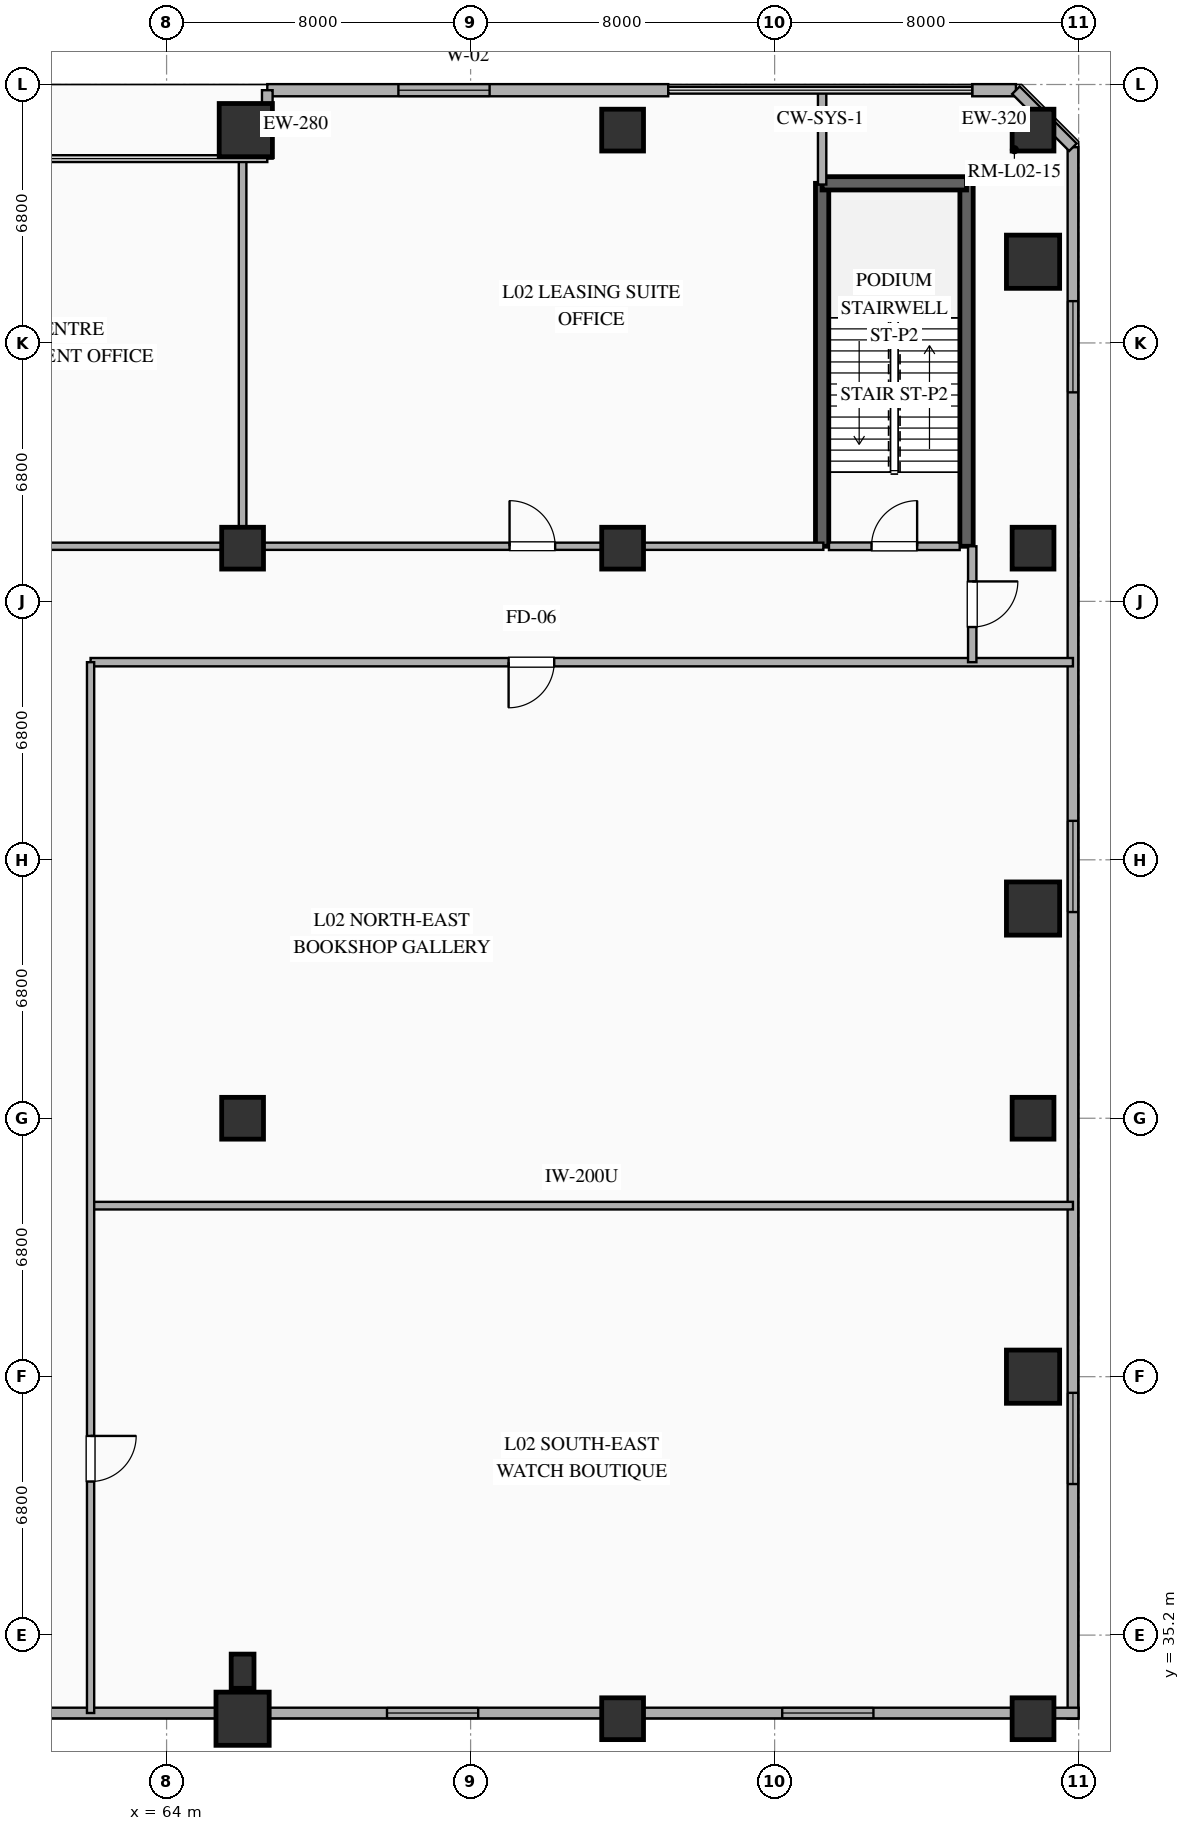
"""IFC4 building model, lengths in metres.
Left out: names, types, materials, properties, quantities, classifications, styles, units other than length and angle.
Written with IfcOpenShell. Run it as: python <this file> out.ifc"""

import sys

from ifc_helpers import new_model, si_unit, direction, frame, frame_2d, origin, origin_2d, place, context, subcontext, project, spatial, rectangle, extrude, element, fill, save


model = new_model("IFC4")
c1 = context("Model", 3, precision=1e-05, world=origin(), true_north=direction((0.0, 1.0)))
c2 = subcontext(c1, "Body", "Model", "MODEL_VIEW")
j1 = project(units=[si_unit("LENGTHUNIT", "METRE"), si_unit("PLANEANGLEUNIT", "RADIAN")], contexts=[c1])
p1 = place(None, origin())
s1 = spatial("IfcSite", under=j1, at=p1, CompositionType="ELEMENT")
p2 = place(p1, origin())
s2 = spatial("IfcBuilding", under=s1, at=p2, CompositionType="ELEMENT")
p3 = place(p2, frame((0.0, 0.0, 11.4)))
s3 = spatial("IfcBuildingStorey", under=s2, at=p3, CompositionType="ELEMENT", Elevation=11.4)
for number, where, z_axis, x_axis in (
    (1, (66.0, 63.8, 0.0), (0.0, 0.0, 1.0), (1.0, 0.0, 0.0)),
    (2, (76.0, 74.8, 0.0), (0.0, 0.0, 1.0), (1.0, 0.0, 0.0)),
    (3, (76.0, 63.8, 0.0), (0.0, 0.0, 1.0), (1.0, 0.0, 0.0)),
    (4, (86.8, 74.8, 0.0), (0.0, 0.0, 1.0), (1.0, 0.0, 0.0)),
    (5, (86.8, 63.8, 0.0), (0.0, 0.0, 1.0), (1.0, 0.0, 0.0)),
    (6, (86.8, 33.0, 0.0), (0.0, 0.0, 1.0), (1.0, 0.0, 0.0)),
    (7, (86.8, 48.8, 0.0), (0.0, 0.0, 1.0), (1.0, 0.0, 0.0)),
):
    element("IfcColumn", number, at=place(p3, frame(where, z_axis=z_axis, x_axis=x_axis)), inside=s3, PredefinedType="COLUMN", context=c2, shape_type="SweptSolid", body=[
        extrude(rectangle(XDim=1.1, YDim=1.1, at=origin_2d()), origin(), (0.0, 0.0, 1.0), 5.1),
    ])
p4 = place(p3, frame((66.0, 33.0, 0.0), z_axis=(0.0, 0.0, 1.0), x_axis=(1.0, 0.0, 0.0)))
e8 = element("IfcColumn", 8, at=p4, inside=s3, PredefinedType="COLUMN", context=c2, shape_type="SweptSolid", body=[
    extrude(rectangle(XDim=1.4, YDim=1.4, at=origin_2d()), origin(), (0.0, 0.0, 1.0), 5.1),
])
for number, where, z_axis, x_axis in (
    (9, (76.0, 33.0, 0.0), (0.0, 0.0, 1.0), (1.0, 0.0, 0.0)),
    (10, (66.0, 48.8, 0.0), (0.0, 0.0, 1.0), (1.0, 0.0, 0.0)),
):
    element("IfcColumn", number, at=place(p3, frame(where, z_axis=z_axis, x_axis=x_axis)), inside=s3, PredefinedType="COLUMN", context=c2, shape_type="SweptSolid", body=[
        extrude(rectangle(XDim=1.1, YDim=1.1, at=origin_2d()), origin(), (0.0, 0.0, 1.0), 5.1),
    ])
for number, where, z_axis, x_axis in (
    (11, (86.8, 42.0, 0.0), (0.0, 0.0, 1.0), (1.0, 0.0, 0.0)),
    (12, (86.8, 54.318, 0.0), (0.0, 0.0, 1.0), (1.0, 0.0, 0.0)),
    (13, (86.8, 71.337, 0.0), (0.0, 0.0, 1.0), (1.0, 0.0, 0.0)),
    (14, (66.084, 74.8, 0.0), (0.0, 0.0, 1.0), (1.0, 0.0, 0.0)),
):
    element("IfcColumn", number, at=place(p3, frame(where, z_axis=z_axis, x_axis=x_axis)), inside=s3, PredefinedType="COLUMN", context=c2, shape_type="SweptSolid", body=[
        extrude(rectangle(XDim=1.4, YDim=1.4, at=origin_2d()), origin(), (0.0, 0.0, 1.0), 5.1),
    ])
for number, where, z_axis, x_axis in (
    (15, (81.25, 63.85, 0.0), (0.0, 0.0, 1.0), (0.0, 1.0, 0.0)),
    (16, (85.05, 63.85, 0.0), (0.0, 0.0, 1.0), (0.0, 1.0, 0.0)),
):
    element("IfcWall", number, at=place(p3, frame(where, z_axis=z_axis, x_axis=x_axis)), inside=s3, PredefinedType="SHEAR", context=c2, shape_type="SweptSolid", body=[
        extrude(rectangle(XDim=9.55, YDim=0.35, at=frame_2d((4.775, 0.0))), origin(), (0.0, 0.0, 1.0), 5.1),
    ])
p5 = place(p3, frame((81.25, 73.4, 0.0), z_axis=(0.0, 0.0, 1.0), x_axis=(1.0, 0.0, 0.0)))
e17 = element("IfcWall", 17, at=p5, inside=s3, PredefinedType="SHEAR", context=c2, shape_type="SweptSolid", body=[
    extrude(rectangle(XDim=3.8, YDim=0.35, at=frame_2d((1.9, 0.0))), origin(), (0.0, 0.0, 1.0), 5.1),
])
p6 = place(p3, frame((66.0, 34.25, 0.0), z_axis=(0.0, 0.0, 1.0), x_axis=(1.0, 0.0, 0.0)))
e18 = element("IfcColumn", 18, at=p6, inside=s3, PredefinedType="PILASTER", context=c2, shape_type="SweptSolid", body=[
    extrude(rectangle(XDim=0.6, YDim=0.9, at=origin_2d()), origin(), (0.0, 0.0, 1.0), 5.1),
])
p7 = place(p3, frame((86.35, 75.85, 0.0), z_axis=(0.0, 0.0, 1.0), x_axis=(-1.0, 0.0, 0.0)))
e19 = element("IfcWall", 19, at=p7, inside=s3, PredefinedType="SOLIDWALL", context=c2, shape_type="SweptSolid", body=[
    extrude(rectangle(XDim=1.15, YDim=0.32, at=frame_2d((0.575, 0.0))), origin(), (0.0, 0.0, 1.0), 5.1),
])
p8 = place(p3, frame((66.65, 75.85, 0.0), z_axis=(0.0, 0.0, 1.0), x_axis=(1.0, 0.0, 0.0)))
e20 = element("IfcWall", 20, at=p8, inside=s3, PredefinedType="SOLIDWALL", context=c2, shape_type="SweptSolid", body=[
    extrude(rectangle(XDim=10.55, YDim=0.32, at=frame_2d((5.275, 0.0))), origin(), (0.0, 0.0, 1.0), 5.1),
])
p9 = place(p8, frame((3.45, 0.0, 0.9)))
e21 = element("IfcOpeningElement", 21, at=p9, cuts=e20, PredefinedType="OPENING", context=c2, shape_type="SweptSolid", body=[
    extrude(rectangle(XDim=2.4, YDim=2.6, at=frame_2d((1.2, 1.3))), frame((0.0, 0.17, 0.0), z_axis=(0.0, -1.0, 0.0), x_axis=(1.0, 0.0, 0.0)), (0.0, 0.0, 1.0), 0.34),
])
p10 = place(p3, frame((66.65, 75.85, 0.0), z_axis=(0.0, 0.0, 1.0), x_axis=(0.0, -1.0, 0.0)))
e22 = element("IfcWall", 22, at=p10, inside=s3, PredefinedType="SOLIDWALL", context=c2, shape_type="SweptSolid", body=[
    extrude(rectangle(XDim=1.8, YDim=0.28, at=frame_2d((0.9, 0.0))), origin(), (0.0, 0.0, 1.0), 5.1),
])
p11 = place(p3, frame((87.85, 74.35, 0.0), z_axis=(0.0, 0.0, 1.0), x_axis=(0.0, -1.0, 0.0)))
e23 = element("IfcWall", 23, at=p11, inside=s3, PredefinedType="SOLIDWALL", context=c2, shape_type="SweptSolid", body=[
    extrude(rectangle(XDim=41.35, YDim=0.28, at=frame_2d((20.675, 0.0))), origin(), (0.0, 0.0, 1.0), 5.1),
])
p12 = place(p11, frame((4.05, 0.0, 0.9)))
e24 = element("IfcOpeningElement", 24, at=p12, cuts=e23, PredefinedType="OPENING", context=c2, shape_type="SweptSolid", body=[
    extrude(rectangle(XDim=2.4, YDim=2.6, at=frame_2d((1.2, 1.3))), frame((0.0, 0.15, 0.0), z_axis=(0.0, -1.0, 0.0), x_axis=(1.0, 0.0, 0.0)), (0.0, 0.0, 1.0), 0.3),
])
p13 = place(p11, frame((17.725, 0.0, 0.9)))
e25 = element("IfcOpeningElement", 25, at=p13, cuts=e23, PredefinedType="OPENING", context=c2, shape_type="SweptSolid", body=[
    extrude(rectangle(XDim=2.4, YDim=2.6, at=frame_2d((1.2, 1.3))), frame((0.0, 0.15, 0.0), z_axis=(0.0, -1.0, 0.0), x_axis=(1.0, 0.0, 0.0)), (0.0, 0.0, 1.0), 0.3),
])
p14 = place(p11, frame((32.775, 0.0, 0.9)))
e26 = element("IfcOpeningElement", 26, at=p14, cuts=e23, PredefinedType="OPENING", context=c2, shape_type="SweptSolid", body=[
    extrude(rectangle(XDim=2.4, YDim=2.6, at=frame_2d((1.2, 1.3))), frame((0.0, 0.15, 0.0), z_axis=(0.0, -1.0, 0.0), x_axis=(1.0, 0.0, 0.0)), (0.0, 0.0, 1.0), 0.3),
])
p15 = place(p3, frame((88.0, 33.15, 0.0), z_axis=(0.0, 0.0, 1.0), x_axis=(-1.0, 0.0, 0.0)))
e27 = element("IfcWall", 27, at=p15, inside=s3, PredefinedType="SOLIDWALL", context=c2, shape_type="SweptSolid", body=[
    extrude(rectangle(XDim=80.0, YDim=0.28, at=frame_2d((40.0, 0.0))), origin(), (0.0, 0.0, 1.0), 4.35),
])
p16 = place(p15, frame((5.4, 0.0, 0.9)))
e28 = element("IfcOpeningElement", 28, at=p16, cuts=e27, PredefinedType="OPENING", context=c2, shape_type="SweptSolid", body=[
    extrude(rectangle(XDim=2.4, YDim=2.6, at=frame_2d((1.2, 1.3))), frame((0.0, 0.15, 0.0), z_axis=(0.0, -1.0, 0.0), x_axis=(1.0, 0.0, 0.0)), (0.0, 0.0, 1.0), 0.3),
])
p17 = place(p15, frame((15.8, 0.0, 0.9)))
e29 = element("IfcOpeningElement", 29, at=p17, cuts=e27, PredefinedType="OPENING", context=c2, shape_type="SweptSolid", body=[
    extrude(rectangle(XDim=2.4, YDim=2.6, at=frame_2d((1.2, 1.3))), frame((0.0, 0.15, 0.0), z_axis=(0.0, -1.0, 0.0), x_axis=(1.0, 0.0, 0.0)), (0.0, 0.0, 1.0), 0.3),
])
p18 = place(p15, frame((38.8, 0.0, 0.9)))
e30 = element("IfcOpeningElement", 30, at=p18, cuts=e27, PredefinedType="OPENING", context=c2, shape_type="SweptSolid", body=[
    extrude(rectangle(XDim=2.4, YDim=2.6, at=frame_2d((1.2, 1.3))), frame((0.0, 0.15, 0.0), z_axis=(0.0, -1.0, 0.0), x_axis=(1.0, 0.0, 0.0)), (0.0, 0.0, 1.0), 0.3),
])
p19 = place(p15, frame((61.8, 0.0, 0.9)))
e31 = element("IfcOpeningElement", 31, at=p19, cuts=e27, PredefinedType="OPENING", context=c2, shape_type="SweptSolid", body=[
    extrude(rectangle(XDim=2.4, YDim=2.6, at=frame_2d((1.2, 1.3))), frame((0.0, 0.15, 0.0), z_axis=(0.0, -1.0, 0.0), x_axis=(1.0, 0.0, 0.0)), (0.0, 0.0, 1.0), 0.3),
])
p20 = place(p15, frame((72.2, 0.0, 0.9)))
e32 = element("IfcOpeningElement", 32, at=p20, cuts=e27, PredefinedType="OPENING", context=c2, shape_type="SweptSolid", body=[
    extrude(rectangle(XDim=2.4, YDim=2.6, at=frame_2d((1.2, 1.3))), frame((0.0, 0.15, 0.0), z_axis=(0.0, -1.0, 0.0), x_axis=(1.0, 0.0, 0.0)), (0.0, 0.0, 1.0), 0.3),
])
p21 = place(p3, frame((87.85, 74.35, 0.0), z_axis=(0.0, 0.0, 1.0), x_axis=(-0.707106781187, 0.707106781187, 0.0)))
e33 = element("IfcWall", 33, at=p21, inside=s3, PredefinedType="SOLIDWALL", context=c2, shape_type="SweptSolid", body=[
    extrude(rectangle(XDim=2.121, YDim=0.28, at=frame_2d((1.061, 0.0))), origin(), (0.0, 0.0, 1.0), 5.1),
])
p22 = place(p3, frame((81.43, 63.85, 0.0), z_axis=(0.0, 0.0, 1.0), x_axis=(1.0, 0.0, 0.0)))
e34 = element("IfcWall", 34, at=p22, inside=s3, PredefinedType="SOLIDWALL", context=c2, shape_type="SweptSolid", body=[
    extrude(rectangle(XDim=3.44, YDim=0.2, at=frame_2d((1.72, 0.0))), origin(), (0.0, 0.0, 1.0), 4.3),
])
p23 = place(p22, frame((1.12, 0.0, 0.0)))
e35 = element("IfcOpeningElement", 35, at=p23, cuts=e34, PredefinedType="OPENING", context=c2, shape_type="SweptSolid", body=[
    extrude(rectangle(XDim=1.2, YDim=2.15, at=frame_2d((0.6, 1.075))), frame((0.0, 0.11, 0.0), z_axis=(0.0, -1.0, 0.0), x_axis=(1.0, 0.0, 0.0)), (0.0, 0.0, 1.0), 0.22),
])
p24 = place(p3, frame((62.0, 46.5, 0.0), z_axis=(0.0, 0.0, 1.0), x_axis=(1.0, 0.0, 0.0)))
e36 = element("IfcWall", 36, at=p24, inside=s3, PredefinedType="PARTITIONING", context=c2, shape_type="SweptSolid", body=[
    extrude(rectangle(XDim=25.85, YDim=0.2, at=frame_2d((12.925, 0.0))), origin(), (0.0, 0.0, 1.0), 4.3),
])
p25 = place(p3, frame((87.85, 60.8, 0.0), z_axis=(0.0, 0.0, 1.0), x_axis=(-1.0, 0.0, 0.0)))
e37 = element("IfcWall", 37, at=p25, inside=s3, PredefinedType="SOLIDWALL", context=c2, shape_type="SweptSolid", body=[
    extrude(rectangle(XDim=25.85, YDim=0.22, at=frame_2d((12.925, 0.0))), origin(), (0.0, 0.0, 1.0), 4.3),
])
p26 = place(p25, frame((13.65, 0.0, 0.0)))
e38 = element("IfcOpeningElement", 38, at=p26, cuts=e37, PredefinedType="OPENING", context=c2, shape_type="SweptSolid", body=[
    extrude(rectangle(XDim=1.2, YDim=2.25, at=frame_2d((0.6, 1.125))), frame((0.0, 0.12, 0.0), z_axis=(0.0, -1.0, 0.0), x_axis=(1.0, 0.0, 0.0)), (0.0, 0.0, 1.0), 0.24),
])
p27 = place(p3, frame((40.768, 63.85, 0.0), z_axis=(0.0, 0.0, 1.0), x_axis=(1.0, 0.0, 0.0)))
e39 = element("IfcWall", 39, at=p27, inside=s3, PredefinedType="PARTITIONING", context=c2, shape_type="SweptSolid", body=[
    extrude(rectangle(XDim=40.514, YDim=0.19, at=frame_2d((20.257, 0.0))), origin(), (0.0, 0.0, 1.0), 4.3),
])
p28 = place(p27, frame((32.257, 0.0, 0.0)))
e40 = element("IfcOpeningElement", 40, at=p28, cuts=e39, PredefinedType="OPENING", context=c2, shape_type="SweptSolid", body=[
    extrude(rectangle(XDim=1.2, YDim=2.25, at=frame_2d((0.6, 1.125))), frame((0.0, 0.105, 0.0), z_axis=(0.0, -1.0, 0.0), x_axis=(1.0, 0.0, 0.0)), (0.0, 0.0, 1.0), 0.21),
])
p29 = place(p27, frame((17.632, 0.0, 0.0)))
e41 = element("IfcOpeningElement", 41, at=p29, cuts=e39, PredefinedType="OPENING", context=c2, shape_type="SweptSolid", body=[
    extrude(rectangle(XDim=1.2, YDim=2.25, at=frame_2d((0.6, 1.125))), frame((0.0, 0.105, 0.0), z_axis=(0.0, -1.0, 0.0), x_axis=(1.0, 0.0, 0.0)), (0.0, 0.0, 1.0), 0.21),
])
p30 = place(p27, frame((8.232, 0.0, 0.0)))
e42 = element("IfcOpeningElement", 42, at=p30, cuts=e39, PredefinedType="OPENING", context=c2, shape_type="SweptSolid", body=[
    extrude(rectangle(XDim=1.2, YDim=2.25, at=frame_2d((0.6, 1.125))), frame((0.0, 0.105, 0.0), z_axis=(0.0, -1.0, 0.0), x_axis=(1.0, 0.0, 0.0)), (0.0, 0.0, 1.0), 0.21),
])
p31 = place(p27, frame((3.982, 0.0, 0.0)))
e43 = element("IfcOpeningElement", 43, at=p31, cuts=e39, PredefinedType="OPENING", context=c2, shape_type="SweptSolid", body=[
    extrude(rectangle(XDim=0.9, YDim=2.1, at=frame_2d((0.45, 1.05))), frame((0.0, 0.105, 0.0), z_axis=(0.0, -1.0, 0.0), x_axis=(1.0, 0.0, 0.0)), (0.0, 0.0, 1.0), 0.21),
])
p32 = place(p3, frame((62.0, 60.8, 0.0), z_axis=(0.0, 0.0, 1.0), x_axis=(0.0, -1.0, 0.0)))
e44 = element("IfcWall", 44, at=p32, inside=s3, PredefinedType="PARTITIONING", context=c2, shape_type="SweptSolid", body=[
    extrude(rectangle(XDim=27.65, YDim=0.19, at=frame_2d((13.825, 0.0))), origin(), (0.0, 0.0, 1.0), 4.3),
])
p33 = place(p32, frame((20.359, 0.0, 0.0)))
e45 = element("IfcOpeningElement", 45, at=p33, cuts=e44, PredefinedType="OPENING", context=c2, shape_type="SweptSolid", body=[
    extrude(rectangle(XDim=1.2, YDim=2.25, at=frame_2d((0.6, 1.125))), frame((0.0, 0.105, 0.0), z_axis=(0.0, -1.0, 0.0), x_axis=(1.0, 0.0, 0.0)), (0.0, 0.0, 1.0), 0.21),
])
p34 = place(p3, frame((66.0, 74.05, 0.0), z_axis=(0.0, 0.0, 1.0), x_axis=(0.0, -1.0, 0.0)))
e46 = element("IfcWall", 46, at=p34, inside=s3, PredefinedType="PARTITIONING", context=c2, shape_type="SweptSolid", body=[
    extrude(rectangle(XDim=10.2, YDim=0.2, at=frame_2d((5.1, 0.0))), origin(), (0.0, 0.0, 1.0), 4.3),
])
p35 = place(p3, frame((85.2, 63.85, 0.0), z_axis=(0.0, 0.0, 1.0), x_axis=(0.0, -1.0, 0.0)))
e47 = element("IfcWall", 47, at=p35, inside=s3, PredefinedType="SOLIDWALL", context=c2, shape_type="SweptSolid", body=[
    extrude(rectangle(XDim=3.05, YDim=0.22, at=frame_2d((1.525, 0.0))), origin(), (0.0, 0.0, 1.0), 4.3),
])
p36 = place(p35, frame((0.925, 0.0, 0.0)))
e48 = element("IfcOpeningElement", 48, at=p36, cuts=e47, PredefinedType="OPENING", context=c2, shape_type="SweptSolid", body=[
    extrude(rectangle(XDim=1.2, YDim=2.25, at=frame_2d((0.6, 1.125))), frame((0.0, 0.12, 0.0), z_axis=(0.0, -1.0, 0.0), x_axis=(1.0, 0.0, 0.0)), (0.0, 0.0, 1.0), 0.24),
])
p37 = place(p3, frame((81.25, 75.85, 0.0), z_axis=(0.0, 0.0, 1.0), x_axis=(0.0, -1.0, 0.0)))
e49 = element("IfcWall", 49, at=p37, inside=s3, PredefinedType="SOLIDWALL", context=c2, shape_type="SweptSolid", body=[
    extrude(rectangle(XDim=2.482, YDim=0.22, at=frame_2d((1.241, 0.0))), origin(), (0.0, 0.0, 1.0), 4.3),
])
p38 = place(p9, origin())
e50 = element("IfcWindow", 50, at=p38, inside=s3, PartitioningType="SINGLE_PANEL", PredefinedType="WINDOW", context=c2, shape_type="SweptSolid", body=[
    extrude(rectangle(XDim=2.4, YDim=2.6, at=frame_2d((1.2, 1.3))), frame((0.0, 0.03, 0.0), z_axis=(0.0, -1.0, 0.0), x_axis=(1.0, 0.0, 0.0)), (0.0, 0.0, 1.0), 0.06),
])
fill(e21, e50)
p39 = place(p12, origin())
e51 = element("IfcWindow", 51, at=p39, inside=s3, PartitioningType="SINGLE_PANEL", PredefinedType="WINDOW", context=c2, shape_type="SweptSolid", body=[
    extrude(rectangle(XDim=2.4, YDim=2.6, at=frame_2d((1.2, 1.3))), frame((0.0, 0.03, 0.0), z_axis=(0.0, -1.0, 0.0), x_axis=(1.0, 0.0, 0.0)), (0.0, 0.0, 1.0), 0.06),
])
fill(e24, e51)
p40 = place(p13, origin())
e52 = element("IfcWindow", 52, at=p40, inside=s3, PartitioningType="SINGLE_PANEL", PredefinedType="WINDOW", context=c2, shape_type="SweptSolid", body=[
    extrude(rectangle(XDim=2.4, YDim=2.6, at=frame_2d((1.2, 1.3))), frame((0.0, 0.03, 0.0), z_axis=(0.0, -1.0, 0.0), x_axis=(1.0, 0.0, 0.0)), (0.0, 0.0, 1.0), 0.06),
])
fill(e25, e52)
p41 = place(p14, origin())
e53 = element("IfcWindow", 53, at=p41, inside=s3, PartitioningType="SINGLE_PANEL", PredefinedType="WINDOW", context=c2, shape_type="SweptSolid", body=[
    extrude(rectangle(XDim=2.4, YDim=2.6, at=frame_2d((1.2, 1.3))), frame((0.0, 0.03, 0.0), z_axis=(0.0, -1.0, 0.0), x_axis=(1.0, 0.0, 0.0)), (0.0, 0.0, 1.0), 0.06),
])
fill(e26, e53)
p42 = place(p16, origin())
e54 = element("IfcWindow", 54, at=p42, inside=s3, PartitioningType="SINGLE_PANEL", PredefinedType="WINDOW", context=c2, shape_type="SweptSolid", body=[
    extrude(rectangle(XDim=2.4, YDim=2.6, at=frame_2d((1.2, 1.3))), frame((0.0, 0.03, 0.0), z_axis=(0.0, -1.0, 0.0), x_axis=(1.0, 0.0, 0.0)), (0.0, 0.0, 1.0), 0.06),
])
fill(e28, e54)
p43 = place(p17, origin())
e55 = element("IfcWindow", 55, at=p43, inside=s3, PartitioningType="SINGLE_PANEL", PredefinedType="WINDOW", context=c2, shape_type="SweptSolid", body=[
    extrude(rectangle(XDim=2.4, YDim=2.6, at=frame_2d((1.2, 1.3))), frame((0.0, 0.03, 0.0), z_axis=(0.0, -1.0, 0.0), x_axis=(1.0, 0.0, 0.0)), (0.0, 0.0, 1.0), 0.06),
])
fill(e29, e55)
p44 = place(p23, origin())
e56 = element("IfcDoor", 56, at=p44, inside=s3, OperationType="SINGLE_SWING_RIGHT", PredefinedType="DOOR", context=c2, shape_type="SweptSolid", body=[
    extrude(rectangle(XDim=1.2, YDim=2.15, at=frame_2d((0.6, 1.075))), frame((0.0, 0.025, 0.0), z_axis=(0.0, -1.0, 0.0), x_axis=(1.0, 0.0, 0.0)), (0.0, 0.0, 1.0), 0.05),
])
fill(e35, e56)
p45 = place(p26, origin())
e57 = element("IfcDoor", 57, at=p45, inside=s3, OperationType="SINGLE_SWING_RIGHT", PredefinedType="DOOR", context=c2, shape_type="SweptSolid", body=[
    extrude(rectangle(XDim=1.2, YDim=2.25, at=frame_2d((0.6, 1.125))), frame((0.0, 0.025, 0.0), z_axis=(0.0, -1.0, 0.0), x_axis=(1.0, 0.0, 0.0)), (0.0, 0.0, 1.0), 0.05),
])
fill(e38, e57)
p46 = place(p28, origin())
e58 = element("IfcDoor", 58, at=p46, inside=s3, OperationType="SINGLE_SWING_LEFT", PredefinedType="DOOR", context=c2, shape_type="SweptSolid", body=[
    extrude(rectangle(XDim=1.2, YDim=2.25, at=frame_2d((0.6, 1.125))), frame((0.0, 0.025, 0.0), z_axis=(0.0, -1.0, 0.0), x_axis=(1.0, 0.0, 0.0)), (0.0, 0.0, 1.0), 0.05),
])
fill(e40, e58)
p47 = place(p33, origin())
e59 = element("IfcDoor", 59, at=p47, inside=s3, OperationType="SINGLE_SWING_LEFT", PredefinedType="DOOR", context=c2, shape_type="SweptSolid", body=[
    extrude(rectangle(XDim=1.2, YDim=2.25, at=frame_2d((0.6, 1.125))), frame((0.0, 0.025, 0.0), z_axis=(0.0, -1.0, 0.0), x_axis=(1.0, 0.0, 0.0)), (0.0, 0.0, 1.0), 0.05),
])
fill(e45, e59)
p48 = place(p36, origin())
e60 = element("IfcDoor", 60, at=p48, inside=s3, OperationType="SINGLE_SWING_LEFT", PredefinedType="DOOR", context=c2, shape_type="SweptSolid", body=[
    extrude(rectangle(XDim=1.2, YDim=2.25, at=frame_2d((0.6, 1.125))), frame((0.0, 0.025, 0.0), z_axis=(0.0, -1.0, 0.0), x_axis=(1.0, 0.0, 0.0)), (0.0, 0.0, 1.0), 0.05),
])
fill(e48, e60)
save(model, sys.argv[1])
